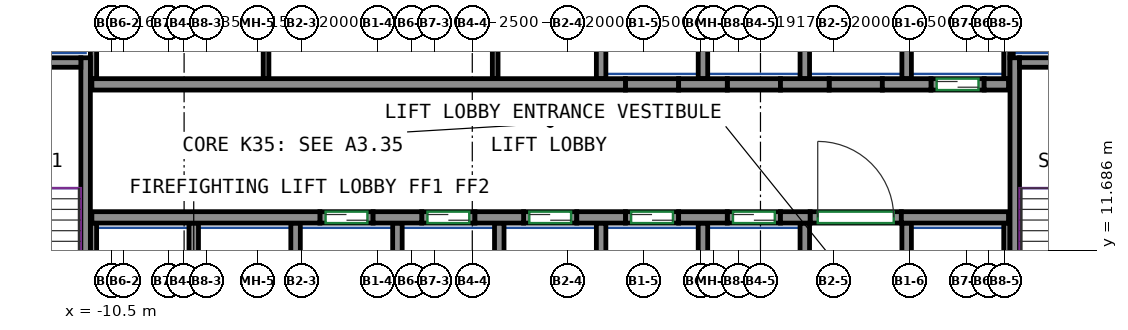
"""IFC4 building model, lengths in metres.
Left out: names, types, materials, properties, quantities, classifications, styles, units other than length and angle.
Written with IfcOpenShell. Run it as: python <this file> out.ifc"""

import sys

from ifc_helpers import new_model, si_unit, direction, frame, frame_2d, origin, place, context, subcontext, project, spatial, rectangle, extrude, source, transform, mapped, element, fill, save


model = new_model("IFC4")
c1 = context("Model", 3, precision=1e-05, world=origin(), true_north=direction((0.0, 1.0)))
c2 = subcontext(c1, "Body", "Model", "MODEL_VIEW")
j1 = project(units=[si_unit("LENGTHUNIT", "METRE"), si_unit("PLANEANGLEUNIT", "RADIAN")], contexts=[c1])
p1 = place(None, origin())
s1 = spatial("IfcSite", under=j1, at=p1, CompositionType="ELEMENT")
p2 = place(p1, origin())
s2 = spatial("IfcBuilding", under=s1, at=p2, CompositionType="ELEMENT")
p3 = place(p2, frame((0.0, 0.0, 150.7)))
s3 = spatial("IfcBuildingStorey", under=s2, at=p3, CompositionType="ELEMENT", Elevation=150.7)
m1 = source(origin(), c2, "Body", "SweptSolid", [
    extrude(rectangle(XDim=7.75, YDim=0.25, at=frame_2d((3.875, 0.0))), origin(), (0.0, 0.0, 1.0), 3.12),
])
p4 = place(p3, frame((-11.175, 9.0, 0.0), z_axis=(0.0, 0.0, 1.0), x_axis=(0.0, 1.0, 0.0)))
e1 = element("IfcWall", 1, at=p4, inside=s3, PredefinedType="SHEAR", context=c2, shape_type="MappedRepresentation", body=[
    mapped(m1, transform((0.0, 0.0, 0.0))),
])
m2 = source(origin(), c2, "Body", "SweptSolid", [
    extrude(rectangle(XDim=3.7, YDim=0.25, at=frame_2d((1.85, 0.0))), origin(), (0.0, 0.0, 1.0), 3.12),
])
p5 = place(p3, frame((-15.0, 16.625, 0.0), z_axis=(0.0, 0.0, 1.0), x_axis=(1.0, 0.0, 0.0)))
e2 = element("IfcWall", 2, at=p5, inside=s3, PredefinedType="SHEAR", context=c2, shape_type="MappedRepresentation", body=[
    mapped(m2, transform((0.0, 0.0, 0.0))),
])
p6 = place(p3, frame((13.275, 9.0, 0.0), z_axis=(0.0, 0.0, 1.0), x_axis=(0.0, 1.0, 0.0)))
e3 = element("IfcWall", 3, at=p6, inside=s3, PredefinedType="SHEAR", context=c2, shape_type="MappedRepresentation", body=[
    mapped(m1, transform((0.0, 0.0, 0.0))),
])
m3 = source(origin(), c2, "Body", "SweptSolid", [
    extrude(rectangle(XDim=3.7, YDim=0.25, at=frame_2d((1.85, 0.0))), origin(), (0.0, 0.0, 1.0), 3.12),
])
p7 = place(p3, frame((13.4, 16.625, 0.0), z_axis=(0.0, 0.0, 1.0), x_axis=(1.0, 0.0, 0.0)))
e4 = element("IfcWall", 4, at=p7, inside=s3, PredefinedType="SHEAR", context=c2, shape_type="MappedRepresentation", body=[
    mapped(m3, transform((0.0, 0.0, 0.0))),
])
m4 = source(origin(), c2, "Body", "SweptSolid", [
    extrude(rectangle(XDim=6.0, YDim=0.3, at=frame_2d((3.0, 0.0))), origin(), (0.0, 0.0, 1.0), 3.12),
])
p8 = place(p3, frame((-11.01, 12.55, 0.0), z_axis=(0.0, 0.0, 1.0), x_axis=(1.0, 0.0, 0.0)))
e5 = element("IfcWall", 5, at=p8, inside=s3, PredefinedType="SHEAR", context=c2, shape_type="MappedRepresentation", body=[
    mapped(m4, transform((0.0, 0.0, 0.0))),
])
m5 = source(origin(), c2, "Body", "SweptSolid", [
    extrude(rectangle(XDim=1.28, YDim=0.3, at=frame_2d((0.64, 0.0))), origin(), (0.0, 0.0, 1.0), 3.12),
])
for number, where, z_axis, x_axis in (
    (6, (-3.61, 12.55, 0.0), (0.0, 0.0, 1.0), (1.0, 0.0, 0.0)),
    (7, (-0.93, 12.55, 0.0), (0.0, 0.0, 1.0), (1.0, 0.0, 0.0)),
    (8, (1.75, 12.55, 0.0), (0.0, 0.0, 1.0), (1.0, 0.0, 0.0)),
    (9, (4.43, 12.55, 0.0), (0.0, 0.0, 1.0), (1.0, 0.0, 0.0)),
):
    element("IfcWall", number, at=place(p3, frame(where, z_axis=z_axis, x_axis=x_axis)), inside=s3, PredefinedType="SHEAR", context=c2, shape_type="MappedRepresentation", body=[
        mapped(m5, transform((0.0, 0.0, 0.0))),
    ])
m6 = source(origin(), c2, "Body", "SweptSolid", [
    extrude(rectangle(XDim=0.78, YDim=0.3, at=frame_2d((0.39, 0.0))), origin(), (0.0, 0.0, 1.0), 3.12),
])
p9 = place(p3, frame((7.11, 12.55, 0.0), z_axis=(0.0, 0.0, 1.0), x_axis=(1.0, 0.0, 0.0)))
e10 = element("IfcWall", 10, at=p9, inside=s3, PredefinedType="SHEAR", context=c2, shape_type="MappedRepresentation", body=[
    mapped(m6, transform((0.0, 0.0, 0.0))),
])
m7 = source(origin(), c2, "Body", "SweptSolid", [
    extrude(rectangle(XDim=2.82, YDim=0.3, at=frame_2d((1.41, 0.0))), origin(), (0.0, 0.0, 1.0), 3.12),
])
p10 = place(p3, frame((10.29, 12.55, 0.0), z_axis=(0.0, 0.0, 1.0), x_axis=(1.0, 0.0, 0.0)))
e11 = element("IfcWall", 11, at=p10, inside=s3, PredefinedType="SHEAR", context=c2, shape_type="MappedRepresentation", body=[
    mapped(m7, transform((0.0, 0.0, 0.0))),
])
m8 = source(origin(), c2, "Body", "SweptSolid", [
    extrude(rectangle(XDim=14.04, YDim=0.3, at=frame_2d((7.02, 0.0))), origin(), (0.0, 0.0, 1.0), 3.12),
])
p11 = place(p3, frame((-11.01, 16.05, 0.0), z_axis=(0.0, 0.0, 1.0), x_axis=(1.0, 0.0, 0.0)))
e12 = element("IfcWall", 12, at=p11, inside=s3, PredefinedType="SHEAR", context=c2, shape_type="MappedRepresentation", body=[
    mapped(m8, transform((0.0, 0.0, 0.0))),
])
p12 = place(p3, frame((4.43, 16.05, 0.0), z_axis=(0.0, 0.0, 1.0), x_axis=(1.0, 0.0, 0.0)))
e13 = element("IfcWall", 13, at=p12, inside=s3, PredefinedType="SHEAR", context=c2, shape_type="MappedRepresentation", body=[
    mapped(m5, transform((0.0, 0.0, 0.0))),
])
m9 = source(origin(), c2, "Body", "SweptSolid", [
    extrude(rectangle(XDim=1.28, YDim=0.3, at=frame_2d((0.64, 0.0))), origin(), (0.0, 0.0, 1.0), 3.12),
])
p13 = place(p3, frame((7.11, 16.05, 0.0), z_axis=(0.0, 0.0, 1.0), x_axis=(1.0, 0.0, 0.0)))
e14 = element("IfcWall", 14, at=p13, inside=s3, PredefinedType="SHEAR", context=c2, shape_type="MappedRepresentation", body=[
    mapped(m9, transform((0.0, 0.0, 0.0))),
])
p14 = place(p3, frame((9.79, 16.05, 0.0), z_axis=(0.0, 0.0, 1.0), x_axis=(1.0, 0.0, 0.0)))
e15 = element("IfcWall", 15, at=p14, inside=s3, PredefinedType="SHEAR", context=c2, shape_type="MappedRepresentation", body=[
    mapped(m5, transform((0.0, 0.0, 0.0))),
])
m10 = source(origin(), c2, "Body", "SweptSolid", [
    extrude(rectangle(XDim=0.64, YDim=0.3, at=frame_2d((0.32, 0.0))), origin(), (0.0, 0.0, 1.0), 3.12),
])
p15 = place(p3, frame((12.47, 16.05, 0.0), z_axis=(0.0, 0.0, 1.0), x_axis=(1.0, 0.0, 0.0)))
e16 = element("IfcWall", 16, at=p15, inside=s3, PredefinedType="SHEAR", context=c2, shape_type="MappedRepresentation", body=[
    mapped(m10, transform((0.0, 0.0, 0.0))),
])
m11 = source(origin(), c2, "Body", "SweptSolid", [
    extrude(rectangle(XDim=1.4, YDim=0.3, at=frame_2d((0.7, 0.0))), origin(), (0.0, 0.0, 1.0), 3.12),
])
p16 = place(p3, frame((-5.01, 12.55, 0.0), z_axis=(0.0, 0.0, 1.0), x_axis=(1.0, 0.0, 0.0)))
e17 = element("IfcWall", 17, at=p16, inside=s3, PredefinedType="PARTITIONING", context=c2, shape_type="MappedRepresentation", body=[
    mapped(m11, transform((0.0, 0.0, 0.0))),
])
p17 = place(p16, frame((0.15, 0.0, 0.0)))
e18 = element("IfcOpeningElement", 18, at=p17, cuts=e17, PredefinedType="OPENING", context=c2, shape_type="SweptSolid", body=[
    extrude(rectangle(XDim=1.1, YDim=2.1, at=frame_2d((0.55, 1.05))), frame((0.0, 0.16, 0.0), z_axis=(0.0, -1.0, 0.0), x_axis=(1.0, 0.0, 0.0)), (0.0, 0.0, 1.0), 0.32),
])
m12 = source(origin(), c2, "Body", "SweptSolid", [
    extrude(rectangle(XDim=1.4, YDim=0.3, at=frame_2d((0.7, 0.0))), origin(), (0.0, 0.0, 1.0), 3.12),
])
p18 = place(p3, frame((-2.33, 12.55, 0.0), z_axis=(0.0, 0.0, 1.0), x_axis=(1.0, 0.0, 0.0)))
e19 = element("IfcWall", 19, at=p18, inside=s3, PredefinedType="PARTITIONING", context=c2, shape_type="MappedRepresentation", body=[
    mapped(m12, transform((0.0, 0.0, 0.0))),
])
p19 = place(p18, frame((0.15, 0.0, 0.0)))
e20 = element("IfcOpeningElement", 20, at=p19, cuts=e19, PredefinedType="OPENING", context=c2, shape_type="SweptSolid", body=[
    extrude(rectangle(XDim=1.1, YDim=2.1, at=frame_2d((0.55, 1.05))), frame((0.0, 0.16, 0.0), z_axis=(0.0, -1.0, 0.0), x_axis=(1.0, 0.0, 0.0)), (0.0, 0.0, 1.0), 0.32),
])
p20 = place(p3, frame((0.35, 12.55, 0.0), z_axis=(0.0, 0.0, 1.0), x_axis=(1.0, 0.0, 0.0)))
e21 = element("IfcWall", 21, at=p20, inside=s3, PredefinedType="PARTITIONING", context=c2, shape_type="MappedRepresentation", body=[
    mapped(m11, transform((0.0, 0.0, 0.0))),
])
p21 = place(p20, frame((0.15, 0.0, 0.0)))
e22 = element("IfcOpeningElement", 22, at=p21, cuts=e21, PredefinedType="OPENING", context=c2, shape_type="SweptSolid", body=[
    extrude(rectangle(XDim=1.1, YDim=2.1, at=frame_2d((0.55, 1.05))), frame((0.0, 0.16, 0.0), z_axis=(0.0, -1.0, 0.0), x_axis=(1.0, 0.0, 0.0)), (0.0, 0.0, 1.0), 0.32),
])
p22 = place(p3, frame((3.03, 12.55, 0.0), z_axis=(0.0, 0.0, 1.0), x_axis=(1.0, 0.0, 0.0)))
e23 = element("IfcWall", 23, at=p22, inside=s3, PredefinedType="PARTITIONING", context=c2, shape_type="MappedRepresentation", body=[
    mapped(m11, transform((0.0, 0.0, 0.0))),
])
p23 = place(p22, frame((0.15, 0.0, 0.0)))
e24 = element("IfcOpeningElement", 24, at=p23, cuts=e23, PredefinedType="OPENING", context=c2, shape_type="SweptSolid", body=[
    extrude(rectangle(XDim=1.1, YDim=2.1, at=frame_2d((0.55, 1.05))), frame((0.0, 0.16, 0.0), z_axis=(0.0, -1.0, 0.0), x_axis=(1.0, 0.0, 0.0)), (0.0, 0.0, 1.0), 0.32),
])
p24 = place(p3, frame((5.71, 12.55, 0.0), z_axis=(0.0, 0.0, 1.0), x_axis=(1.0, 0.0, 0.0)))
e25 = element("IfcWall", 25, at=p24, inside=s3, PredefinedType="PARTITIONING", context=c2, shape_type="MappedRepresentation", body=[
    mapped(m12, transform((0.0, 0.0, 0.0))),
])
p25 = place(p24, frame((0.15, 0.0, 0.0)))
e26 = element("IfcOpeningElement", 26, at=p25, cuts=e25, PredefinedType="OPENING", context=c2, shape_type="SweptSolid", body=[
    extrude(rectangle(XDim=1.1, YDim=2.1, at=frame_2d((0.55, 1.05))), frame((0.0, 0.16, 0.0), z_axis=(0.0, -1.0, 0.0), x_axis=(1.0, 0.0, 0.0)), (0.0, 0.0, 1.0), 0.32),
])
p26 = place(p3, frame((11.07, 16.05, 0.0), z_axis=(0.0, 0.0, 1.0), x_axis=(1.0, 0.0, 0.0)))
e27 = element("IfcWall", 27, at=p26, inside=s3, PredefinedType="PARTITIONING", context=c2, shape_type="MappedRepresentation", body=[
    mapped(m11, transform((0.0, 0.0, 0.0))),
])
p27 = place(p26, frame((0.15, 0.0, 0.0)))
e28 = element("IfcOpeningElement", 28, at=p27, cuts=e27, PredefinedType="OPENING", context=c2, shape_type="SweptSolid", body=[
    extrude(rectangle(XDim=1.1, YDim=2.1, at=frame_2d((0.55, 1.05))), frame((0.0, 0.16, 0.0), z_axis=(0.0, -1.0, 0.0), x_axis=(1.0, 0.0, 0.0)), (0.0, 0.0, 1.0), 0.32),
])
m13 = source(origin(), c2, "Body", "SweptSolid", [
    extrude(rectangle(XDim=2.4, YDim=0.3, at=frame_2d((1.2, 0.0))), origin(), (0.0, 0.0, 1.0), 3.12),
])
p28 = place(p3, frame((7.89, 12.55, 0.0), z_axis=(0.0, 0.0, 1.0), x_axis=(1.0, 0.0, 0.0)))
e29 = element("IfcWall", 29, at=p28, inside=s3, PredefinedType="PARTITIONING", context=c2, shape_type="MappedRepresentation", body=[
    mapped(m13, transform((0.0, 0.0, 0.0))),
])
p29 = place(p28, frame((0.2, 0.0, 0.0)))
e30 = element("IfcOpeningElement", 30, at=p29, cuts=e29, PredefinedType="OPENING", context=c2, shape_type="SweptSolid", body=[
    extrude(rectangle(XDim=2.0, YDim=2.1, at=frame_2d((1.0, 1.05))), frame((0.0, 0.16, 0.0), z_axis=(0.0, -1.0, 0.0), x_axis=(1.0, 0.0, 0.0)), (0.0, 0.0, 1.0), 0.32),
])
p30 = place(p3, frame((3.03, 16.05, 0.0), z_axis=(0.0, 0.0, 1.0), x_axis=(1.0, 0.0, 0.0)))
e31 = element("IfcWall", 31, at=p30, inside=s3, PredefinedType="PARTITIONING", context=c2, shape_type="MappedRepresentation", body=[
    mapped(m11, transform((0.0, 0.0, 0.0))),
])
for number, where, z_axis, x_axis in (
    (32, (5.71, 16.05, 0.0), (0.0, 0.0, 1.0), (1.0, 0.0, 0.0)),
    (33, (8.39, 16.05, 0.0), (0.0, 0.0, 1.0), (1.0, 0.0, 0.0)),
):
    element("IfcWall", number, at=place(p3, frame(where, z_axis=z_axis, x_axis=x_axis)), inside=s3, PredefinedType="PARTITIONING", context=c2, shape_type="MappedRepresentation", body=[
        mapped(m12, transform((0.0, 0.0, 0.0))),
    ])
m14 = source(origin(), c2, "Body", "SweptSolid", [
    extrude(rectangle(XDim=3.275, YDim=0.165, at=frame_2d((1.638, 0.0))), origin(), (0.0, 0.0, 1.0), 3.12),
])
p31 = place(p3, frame((13.067, 16.2, 0.0), z_axis=(0.0, 0.0, 1.0), x_axis=(0.0, 1.0, 0.0)))
e34 = element("IfcWall", 34, at=p31, inside=s3, PredefinedType="PARTITIONING", context=c2, shape_type="MappedRepresentation", body=[
    mapped(m14, transform((0.0, 0.0, 0.0))),
])
m15 = source(origin(), c2, "Body", "SweptSolid", [
    extrude(rectangle(XDim=4.8, YDim=0.165, at=frame_2d((2.4, 0.0))), origin(), (0.0, 0.0, 1.0), 3.12),
])
p32 = place(p3, frame((-10.968, 16.2, 0.0), z_axis=(0.0, 0.0, 1.0), x_axis=(0.0, 1.0, 0.0)))
e35 = element("IfcWall", 35, at=p32, inside=s3, PredefinedType="PARTITIONING", context=c2, shape_type="MappedRepresentation", body=[
    mapped(m15, transform((0.0, 0.0, 0.0))),
])
m16 = source(origin(), c2, "Body", "SweptSolid", [
    extrude(rectangle(XDim=3.275, YDim=0.25, at=frame_2d((1.638, 0.0))), origin(), (0.0, 0.0, 1.0), 3.12),
])
p33 = place(p3, frame((10.43, 16.2, 0.0), z_axis=(0.0, 0.0, 1.0), x_axis=(0.0, 1.0, 0.0)))
e36 = element("IfcWall", 36, at=p33, inside=s3, PredefinedType="PARTITIONING", context=c2, shape_type="MappedRepresentation", body=[
    mapped(m16, transform((0.0, 0.0, 0.0))),
])
m17 = source(origin(), c2, "Body", "SweptSolid", [
    extrude(rectangle(XDim=2.725, YDim=0.085, at=frame_2d((1.363, 0.0))), origin(), (0.0, 0.0, 1.0), 3.12),
])
p34 = place(p3, frame((13.192, 16.75, 0.0), z_axis=(0.0, 0.0, 1.0), x_axis=(0.0, 1.0, 0.0)))
e37 = element("IfcWall", 37, at=p34, inside=s3, PredefinedType="PARTITIONING", context=c2, shape_type="MappedRepresentation", body=[
    mapped(m17, transform((0.0, 0.0, 0.0))),
])
for number, where, z_axis, x_axis in (
    (38, (2.39, 16.2, 0.0), (0.0, 0.0, 1.0), (0.0, 1.0, 0.0)),
    (39, (5.07, 16.2, 0.0), (0.0, 0.0, 1.0), (0.0, 1.0, 0.0)),
    (40, (7.75, 16.2, 0.0), (0.0, 0.0, 1.0), (0.0, 1.0, 0.0)),
):
    element("IfcWall", number, at=place(p3, frame(where, z_axis=z_axis, x_axis=x_axis)), inside=s3, PredefinedType="PARTITIONING", context=c2, shape_type="MappedRepresentation", body=[
        mapped(m16, transform((0.0, 0.0, 0.0))),
    ])
m18 = source(origin(), c2, "Body", "SweptSolid", [
    extrude(rectangle(XDim=3.4, YDim=0.25, at=frame_2d((1.7, 0.0))), origin(), (0.0, 0.0, 1.0), 3.12),
])
p35 = place(p3, frame((10.43, 9.0, 0.0), z_axis=(0.0, 0.0, 1.0), x_axis=(0.0, 1.0, 0.0)))
e41 = element("IfcWall", 41, at=p35, inside=s3, PredefinedType="PARTITIONING", context=c2, shape_type="MappedRepresentation", body=[
    mapped(m18, transform((0.0, 0.0, 0.0))),
])
m19 = source(origin(), c2, "Body", "SweptSolid", [
    extrude(rectangle(XDim=3.4, YDim=0.165, at=frame_2d((1.7, 0.0))), origin(), (0.0, 0.0, 1.0), 3.12),
])
p36 = place(p3, frame((13.067, 9.0, 0.0), z_axis=(0.0, 0.0, 1.0), x_axis=(0.0, 1.0, 0.0)))
e42 = element("IfcWall", 42, at=p36, inside=s3, PredefinedType="PARTITIONING", context=c2, shape_type="MappedRepresentation", body=[
    mapped(m19, transform((0.0, 0.0, 0.0))),
])
for number, where, z_axis, x_axis in (
    (43, (2.39, 9.0, 0.0), (0.0, 0.0, 1.0), (0.0, 1.0, 0.0)),
    (44, (5.07, 9.0, 0.0), (0.0, 0.0, 1.0), (0.0, 1.0, 0.0)),
    (45, (7.75, 9.0, 0.0), (0.0, 0.0, 1.0), (0.0, 1.0, 0.0)),
    (46, (-0.29, 9.0, 0.0), (0.0, 0.0, 1.0), (0.0, 1.0, 0.0)),
):
    element("IfcWall", number, at=place(p3, frame(where, z_axis=z_axis, x_axis=x_axis)), inside=s3, PredefinedType="PARTITIONING", context=c2, shape_type="MappedRepresentation", body=[
        mapped(m18, transform((0.0, 0.0, 0.0))),
    ])
p37 = place(p3, frame((-10.968, 9.0, 0.0), z_axis=(0.0, 0.0, 1.0), x_axis=(0.0, 1.0, 0.0)))
e47 = element("IfcWall", 47, at=p37, inside=s3, PredefinedType="PARTITIONING", context=c2, shape_type="MappedRepresentation", body=[
    mapped(m19, transform((0.0, 0.0, 0.0))),
])
for number, where, z_axis, x_axis in (
    (48, (-2.97, 9.0, 0.0), (0.0, 0.0, 1.0), (0.0, 1.0, 0.0)),
    (49, (-5.65, 9.0, 0.0), (0.0, 0.0, 1.0), (0.0, 1.0, 0.0)),
    (50, (-8.33, 9.0, 0.0), (0.0, 0.0, 1.0), (0.0, 1.0, 0.0)),
):
    element("IfcWall", number, at=place(p3, frame(where, z_axis=z_axis, x_axis=x_axis)), inside=s3, PredefinedType="PARTITIONING", context=c2, shape_type="MappedRepresentation", body=[
        mapped(m18, transform((0.0, 0.0, 0.0))),
    ])
m20 = source(origin(), c2, "Body", "SweptSolid", [
    extrude(rectangle(XDim=4.8, YDim=0.15, at=frame_2d((2.4, 0.0))), origin(), (0.0, 0.0, 1.0), 3.12),
])
for number, where, z_axis, x_axis in (
    (51, (-6.427, 16.2, 0.0), (0.0, 0.0, 1.0), (0.0, 1.0, 0.0)),
    (52, (-0.397, 16.2, 0.0), (0.0, 0.0, 1.0), (0.0, 1.0, 0.0)),
):
    element("IfcWall", number, at=place(p3, frame(where, z_axis=z_axis, x_axis=x_axis)), inside=s3, PredefinedType="PARTITIONING", context=c2, shape_type="MappedRepresentation", body=[
        mapped(m20, transform((0.0, 0.0, 0.0))),
    ])
p38 = place(p29, origin())
e53 = element("IfcDoor", 53, at=p38, inside=s3, OperationType="DOUBLE_DOOR_SINGLE_SWING", PredefinedType="DOOR", context=c2, shape_type="SweptSolid", body=[
    extrude(rectangle(XDim=2.0, YDim=2.1, at=frame_2d((1.0, 1.05))), frame((0.0, 0.025, 0.0), z_axis=(0.0, -1.0, 0.0), x_axis=(1.0, 0.0, 0.0)), (0.0, 0.0, 1.0), 0.05),
])
fill(e30, e53)
p39 = place(p17, origin())
e54 = element("IfcDoor", 54, at=p39, inside=s3, OperationType="DOUBLE_DOOR_SLIDING", PredefinedType="DOOR", context=c2, shape_type="SweptSolid", body=[
    extrude(rectangle(XDim=1.1, YDim=2.1, at=frame_2d((0.55, 1.05))), frame((0.0, 0.025, 0.0), z_axis=(0.0, -1.0, 0.0), x_axis=(1.0, 0.0, 0.0)), (0.0, 0.0, 1.0), 0.05),
])
fill(e18, e54)
p40 = place(p19, origin())
e55 = element("IfcDoor", 55, at=p40, inside=s3, OperationType="DOUBLE_DOOR_SLIDING", PredefinedType="DOOR", context=c2, shape_type="SweptSolid", body=[
    extrude(rectangle(XDim=1.1, YDim=2.1, at=frame_2d((0.55, 1.05))), frame((0.0, 0.025, 0.0), z_axis=(0.0, -1.0, 0.0), x_axis=(1.0, 0.0, 0.0)), (0.0, 0.0, 1.0), 0.05),
])
fill(e20, e55)
p41 = place(p21, origin())
e56 = element("IfcDoor", 56, at=p41, inside=s3, OperationType="DOUBLE_DOOR_SLIDING", PredefinedType="DOOR", context=c2, shape_type="SweptSolid", body=[
    extrude(rectangle(XDim=1.1, YDim=2.1, at=frame_2d((0.55, 1.05))), frame((0.0, 0.025, 0.0), z_axis=(0.0, -1.0, 0.0), x_axis=(1.0, 0.0, 0.0)), (0.0, 0.0, 1.0), 0.05),
])
fill(e22, e56)
p42 = place(p23, origin())
e57 = element("IfcDoor", 57, at=p42, inside=s3, OperationType="DOUBLE_DOOR_SLIDING", PredefinedType="DOOR", context=c2, shape_type="SweptSolid", body=[
    extrude(rectangle(XDim=1.1, YDim=2.1, at=frame_2d((0.55, 1.05))), frame((0.0, 0.025, 0.0), z_axis=(0.0, -1.0, 0.0), x_axis=(1.0, 0.0, 0.0)), (0.0, 0.0, 1.0), 0.05),
])
fill(e24, e57)
p43 = place(p25, origin())
e58 = element("IfcDoor", 58, at=p43, inside=s3, OperationType="DOUBLE_DOOR_SLIDING", PredefinedType="DOOR", context=c2, shape_type="SweptSolid", body=[
    extrude(rectangle(XDim=1.1, YDim=2.1, at=frame_2d((0.55, 1.05))), frame((0.0, 0.025, 0.0), z_axis=(0.0, -1.0, 0.0), x_axis=(1.0, 0.0, 0.0)), (0.0, 0.0, 1.0), 0.05),
])
fill(e26, e58)
p44 = place(p27, origin())
e59 = element("IfcDoor", 59, at=p44, inside=s3, OperationType="DOUBLE_DOOR_SLIDING", PredefinedType="DOOR", context=c2, shape_type="SweptSolid", body=[
    extrude(rectangle(XDim=1.1, YDim=2.1, at=frame_2d((0.55, 1.05))), frame((0.0, 0.025, 0.0), z_axis=(0.0, -1.0, 0.0), x_axis=(1.0, 0.0, 0.0)), (0.0, 0.0, 1.0), 0.05),
])
fill(e28, e59)
save(model, sys.argv[1])
